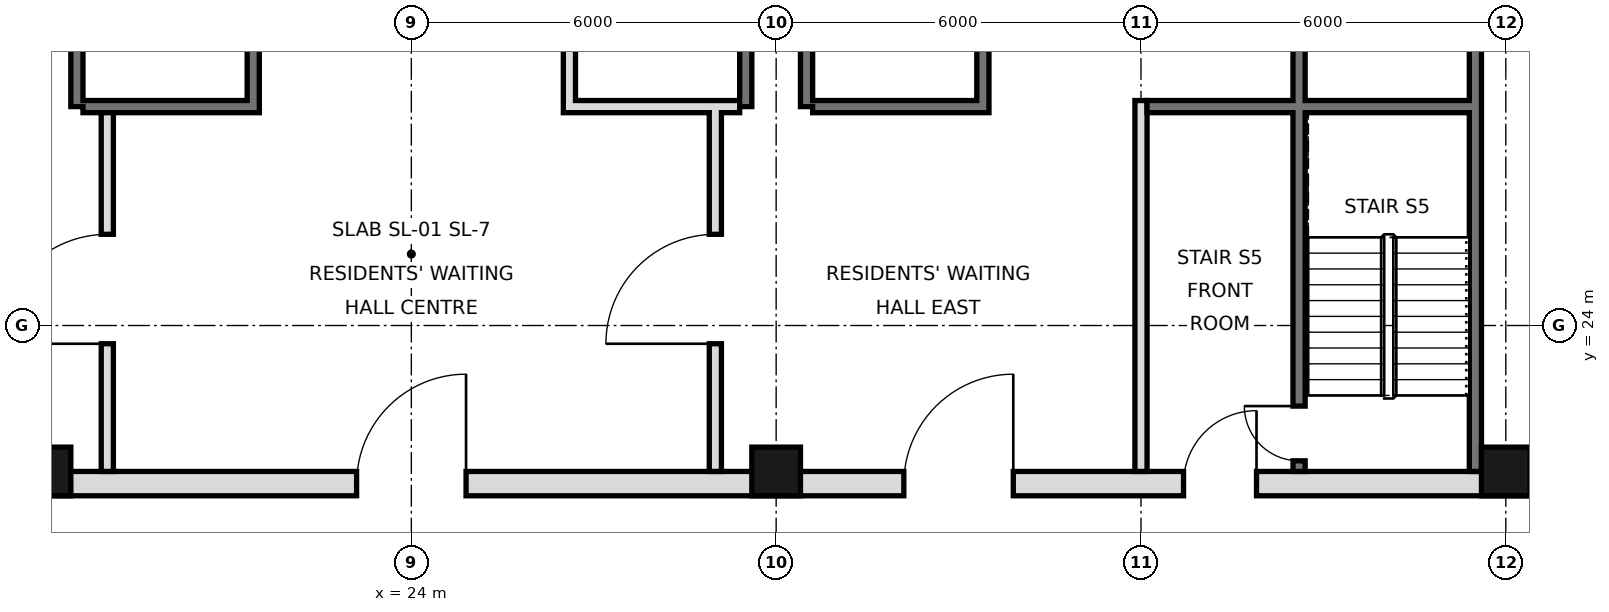
"""IFC4 building model, lengths in metres.
Left out: names, types, materials, properties, quantities, classifications, styles, units other than length and angle.
Written with IfcOpenShell. Run it as: python <this file> out.ifc"""

import sys

from ifc_helpers import new_model, si_unit, direction, frame, frame_2d, origin, origin_2d, place, context, subcontext, project, spatial, rectangle, hollow_rectangle, extrude, element, fill, save


model = new_model("IFC4")
c1 = context("Model", 3, precision=1e-05, world=origin(), true_north=direction((0.0, 1.0)))
c2 = subcontext(c1, "Body", "Model", "MODEL_VIEW")
j1 = project(units=[si_unit("LENGTHUNIT", "METRE"), si_unit("PLANEANGLEUNIT", "RADIAN")], contexts=[c1])
p1 = place(None, origin())
s1 = spatial("IfcSite", under=j1, at=p1, CompositionType="ELEMENT")
p2 = place(p1, origin())
s2 = spatial("IfcBuilding", under=s1, at=p2, CompositionType="ELEMENT")
p3 = place(p2, frame((0.0, 0.0, 158.2)))
s3 = spatial("IfcBuildingStorey", under=s2, at=p3, CompositionType="ELEMENT", Elevation=158.2)
for number, where, z_axis, x_axis in (
    (1, (18.0, 21.6, 0.0), (0.0, 0.0, 1.0), (1.0, 0.0, 0.0)),
    (2, (30.0, 21.6, 0.0), (0.0, 0.0, 1.0), (1.0, 0.0, 0.0)),
    (3, (42.0, 21.6, 0.0), (0.0, 0.0, 1.0), (1.0, 0.0, 0.0)),
):
    element("IfcColumn", number, at=place(p3, frame(where, z_axis=z_axis, x_axis=x_axis)), inside=s3, PredefinedType="COLUMN", context=c2, shape_type="SweptSolid", body=[
        extrude(hollow_rectangle(XDim=0.8, YDim=0.8, WallThickness=0.045, at=origin_2d()), origin(), (0.0, 0.0, 1.0), 3.6),
    ])
p4 = place(p3, frame((41.5, 21.6, 0.0), z_axis=(0.0, 0.0, 1.0), x_axis=(0.0, 1.0, 0.0)))
e4 = element("IfcWall", 4, at=p4, inside=s3, PredefinedType="SOLIDWALL", context=c2, shape_type="SweptSolid", body=[
    extrude(rectangle(XDim=23.5, YDim=0.2, at=frame_2d((11.75, 0.0))), origin(), (0.0, 0.0, 1.0), 3.38),
])
for number, where, z_axis, x_axis in (
    (5, (18.5, 27.6, 0.0), (0.0, 0.0, 1.0), (0.0, 1.0, 0.0)),
    (6, (29.5, 27.6, 0.0), (0.0, 0.0, 1.0), (0.0, 1.0, 0.0)),
    (7, (30.5, 27.6, 0.0), (0.0, 0.0, 1.0), (0.0, 1.0, 0.0)),
):
    element("IfcWall", number, at=place(p3, frame(where, z_axis=z_axis, x_axis=x_axis)), inside=s3, PredefinedType="SOLIDWALL", context=c2, shape_type="SweptSolid", body=[
        extrude(rectangle(XDim=17.5, YDim=0.2, at=frame_2d((8.75, 0.0))), origin(), (0.0, 0.0, 1.0), 3.38),
    ])
p5 = place(p3, frame((5.6, 21.4, 0.0), z_axis=(0.0, 0.0, 1.0), x_axis=(1.0, 0.0, 0.0)))
e8 = element("IfcWall", 8, at=p5, inside=s3, PredefinedType="SOLIDWALL", context=c2, shape_type="SweptSolid", body=[
    extrude(rectangle(XDim=36.8, YDim=0.4, at=frame_2d((18.4, 0.0))), origin(), (0.0, 0.0, 1.0), 3.38),
])
p6 = place(p5, frame((8.5, 0.0, 0.0)))
e9 = element("IfcOpeningElement", 9, at=p6, cuts=e8, PredefinedType="OPENING", context=c2, shape_type="SweptSolid", body=[
    extrude(rectangle(XDim=1.8, YDim=2.1, at=frame_2d((0.9, 1.05))), frame((0.0, 0.21, 0.0), z_axis=(0.0, -1.0, 0.0), x_axis=(1.0, 0.0, 0.0)), (0.0, 0.0, 1.0), 0.42),
])
p7 = place(p5, frame((17.5, 0.0, 0.0)))
e10 = element("IfcOpeningElement", 10, at=p7, cuts=e8, PredefinedType="OPENING", context=c2, shape_type="SweptSolid", body=[
    extrude(rectangle(XDim=1.8, YDim=2.1, at=frame_2d((0.9, 1.05))), frame((0.0, 0.21, 0.0), z_axis=(0.0, -1.0, 0.0), x_axis=(1.0, 0.0, 0.0)), (0.0, 0.0, 1.0), 0.42),
])
p8 = place(p5, frame((26.5, 0.0, 0.0)))
e11 = element("IfcOpeningElement", 11, at=p8, cuts=e8, PredefinedType="OPENING", context=c2, shape_type="SweptSolid", body=[
    extrude(rectangle(XDim=1.8, YDim=2.1, at=frame_2d((0.9, 1.05))), frame((0.0, 0.21, 0.0), z_axis=(0.0, -1.0, 0.0), x_axis=(1.0, 0.0, 0.0)), (0.0, 0.0, 1.0), 0.42),
])
p9 = place(p5, frame((4.5, 0.0, 0.0)))
e12 = element("IfcOpeningElement", 12, at=p9, cuts=e8, PredefinedType="OPENING", context=c2, shape_type="SweptSolid", body=[
    extrude(rectangle(XDim=1.2, YDim=2.1, at=frame_2d((0.6, 1.05))), frame((0.0, 0.21, 0.0), z_axis=(0.0, -1.0, 0.0), x_axis=(1.0, 0.0, 0.0)), (0.0, 0.0, 1.0), 0.42),
])
p10 = place(p5, frame((31.1, 0.0, 0.0)))
e13 = element("IfcOpeningElement", 13, at=p10, cuts=e8, PredefinedType="OPENING", context=c2, shape_type="SweptSolid", body=[
    extrude(rectangle(XDim=1.2, YDim=2.1, at=frame_2d((0.6, 1.05))), frame((0.0, 0.21, 0.0), z_axis=(0.0, -1.0, 0.0), x_axis=(1.0, 0.0, 0.0)), (0.0, 0.0, 1.0), 0.42),
])
p11 = place(p3, frame((19.0, 21.6, 0.0), z_axis=(0.0, 0.0, 1.0), x_axis=(0.0, 1.0, 0.0)))
e14 = element("IfcWall", 14, at=p11, inside=s3, PredefinedType="PARTITIONING", context=c2, shape_type="SweptSolid", body=[
    extrude(rectangle(XDim=6.0, YDim=0.2, at=frame_2d((3.0, 0.0))), origin(), (0.0, 0.0, 1.0), 3.38),
])
p12 = place(p11, frame((2.1, 0.0, 0.0)))
e15 = element("IfcOpeningElement", 15, at=p12, cuts=e14, PredefinedType="OPENING", context=c2, shape_type="SweptSolid", body=[
    extrude(rectangle(XDim=1.8, YDim=2.1, at=frame_2d((0.9, 1.05))), frame((0.0, 0.11, 0.0), z_axis=(0.0, -1.0, 0.0), x_axis=(1.0, 0.0, 0.0)), (0.0, 0.0, 1.0), 0.22),
])
p13 = place(p3, frame((29.0, 21.6, 0.0), z_axis=(0.0, 0.0, 1.0), x_axis=(0.0, 1.0, 0.0)))
e16 = element("IfcWall", 16, at=p13, inside=s3, PredefinedType="PARTITIONING", context=c2, shape_type="SweptSolid", body=[
    extrude(rectangle(XDim=6.0, YDim=0.2, at=frame_2d((3.0, 0.0))), origin(), (0.0, 0.0, 1.0), 3.38),
])
p14 = place(p13, frame((2.1, 0.0, 0.0)))
e17 = element("IfcOpeningElement", 17, at=p14, cuts=e16, PredefinedType="OPENING", context=c2, shape_type="SweptSolid", body=[
    extrude(rectangle(XDim=1.8, YDim=2.1, at=frame_2d((0.9, 1.05))), frame((0.0, 0.11, 0.0), z_axis=(0.0, -1.0, 0.0), x_axis=(1.0, 0.0, 0.0)), (0.0, 0.0, 1.0), 0.22),
])
p15 = place(p3, frame((21.4, 27.5, 0.0), z_axis=(0.0, 0.0, 1.0), x_axis=(0.0, 1.0, 0.0)))
e18 = element("IfcWall", 18, at=p15, inside=s3, PredefinedType="SOLIDWALL", context=c2, shape_type="SweptSolid", body=[
    extrude(rectangle(XDim=17.5, YDim=0.2, at=frame_2d((8.75, 0.0))), origin(), (0.0, 0.0, 1.0), 3.38),
])
p16 = place(p15, frame((9.8, 0.0, 0.0)))
e19 = element("IfcOpeningElement", 19, at=p16, cuts=e18, PredefinedType="OPENING", context=c2, shape_type="SweptSolid", body=[
    extrude(rectangle(XDim=1.0, YDim=2.1, at=frame_2d((0.5, 1.05))), frame((0.0, 0.11, 0.0), z_axis=(0.0, -1.0, 0.0), x_axis=(1.0, 0.0, 0.0)), (0.0, 0.0, 1.0), 0.22),
])
p17 = place(p15, frame((7.4, 0.0, 0.0)))
e20 = element("IfcOpeningElement", 20, at=p17, cuts=e18, PredefinedType="OPENING", context=c2, shape_type="SweptSolid", body=[
    extrude(rectangle(XDim=0.9, YDim=2.1, at=frame_2d((0.45, 1.05))), frame((0.0, 0.11, 0.0), z_axis=(0.0, -1.0, 0.0), x_axis=(1.0, 0.0, 0.0)), (0.0, 0.0, 1.0), 0.22),
])
p18 = place(p3, frame((26.6, 27.5, 0.0), z_axis=(0.0, 0.0, 1.0), x_axis=(0.0, 1.0, 0.0)))
e21 = element("IfcWall", 21, at=p18, inside=s3, PredefinedType="SOLIDWALL", context=c2, shape_type="SweptSolid", body=[
    extrude(rectangle(XDim=17.5, YDim=0.2, at=frame_2d((8.75, 0.0))), origin(), (0.0, 0.0, 1.0), 3.38),
])
p19 = place(p18, frame((4.3, 0.0, 0.0)))
e22 = element("IfcOpeningElement", 22, at=p19, cuts=e21, PredefinedType="OPENING", context=c2, shape_type="SweptSolid", body=[
    extrude(rectangle(XDim=0.9, YDim=2.1, at=frame_2d((0.45, 1.05))), frame((0.0, 0.11, 0.0), z_axis=(0.0, -1.0, 0.0), x_axis=(1.0, 0.0, 0.0)), (0.0, 0.0, 1.0), 0.22),
])
p20 = place(p18, frame((10.35, 0.0, 0.0)))
e23 = element("IfcOpeningElement", 23, at=p20, cuts=e21, PredefinedType="OPENING", context=c2, shape_type="SweptSolid", body=[
    extrude(rectangle(XDim=1.0, YDim=2.1, at=frame_2d((0.5, 1.05))), frame((0.0, 0.11, 0.0), z_axis=(0.0, -1.0, 0.0), x_axis=(1.0, 0.0, 0.0)), (0.0, 0.0, 1.0), 0.22),
])
p21 = place(p18, frame((15.475, 0.0, 0.0)))
e24 = element("IfcOpeningElement", 24, at=p21, cuts=e21, PredefinedType="OPENING", context=c2, shape_type="SweptSolid", body=[
    extrude(rectangle(XDim=1.0, YDim=2.1, at=frame_2d((0.5, 1.05))), frame((0.0, 0.11, 0.0), z_axis=(0.0, -1.0, 0.0), x_axis=(1.0, 0.0, 0.0)), (0.0, 0.0, 1.0), 0.22),
])
p22 = place(p3, frame((33.4, 27.5, 0.0), z_axis=(0.0, 0.0, 1.0), x_axis=(0.0, 1.0, 0.0)))
e25 = element("IfcWall", 25, at=p22, inside=s3, PredefinedType="SOLIDWALL", context=c2, shape_type="SweptSolid", body=[
    extrude(rectangle(XDim=17.5, YDim=0.2, at=frame_2d((8.75, 0.0))), origin(), (0.0, 0.0, 1.0), 3.38),
])
p23 = place(p22, frame((15.4, 0.0, 0.0)))
e26 = element("IfcOpeningElement", 26, at=p23, cuts=e25, PredefinedType="OPENING", context=c2, shape_type="SweptSolid", body=[
    extrude(rectangle(XDim=1.1, YDim=2.1, at=frame_2d((0.55, 1.05))), frame((0.0, 0.11, 0.0), z_axis=(0.0, -1.0, 0.0), x_axis=(1.0, 0.0, 0.0)), (0.0, 0.0, 1.0), 0.22),
])
p24 = place(p22, frame((9.9, 0.0, 0.0)))
e27 = element("IfcOpeningElement", 27, at=p24, cuts=e25, PredefinedType="OPENING", context=c2, shape_type="SweptSolid", body=[
    extrude(rectangle(XDim=0.9, YDim=2.1, at=frame_2d((0.45, 1.05))), frame((0.0, 0.11, 0.0), z_axis=(0.0, -1.0, 0.0), x_axis=(1.0, 0.0, 0.0)), (0.0, 0.0, 1.0), 0.22),
])
p25 = place(p3, frame((36.0, 21.6, 0.0), z_axis=(0.0, 0.0, 1.0), x_axis=(0.0, 1.0, 0.0)))
e28 = element("IfcWall", 28, at=p25, inside=s3, PredefinedType="PARTITIONING", context=c2, shape_type="SweptSolid", body=[
    extrude(rectangle(XDim=6.1, YDim=0.2, at=frame_2d((3.05, 0.0))), origin(), (0.0, 0.0, 1.0), 3.38),
])
p26 = place(p3, frame((38.6, 21.6, 0.0), z_axis=(0.0, 0.0, 1.0), x_axis=(0.0, 1.0, 0.0)))
e29 = element("IfcWall", 29, at=p26, inside=s3, PredefinedType="SOLIDWALL", context=c2, shape_type="SweptSolid", body=[
    extrude(rectangle(XDim=23.4, YDim=0.2, at=frame_2d((11.7, 0.0))), origin(), (0.0, 0.0, 1.0), 3.38),
])
p27 = place(p26, frame((15.7, 0.0, 0.0)))
e30 = element("IfcOpeningElement", 30, at=p27, cuts=e29, PredefinedType="OPENING", context=c2, shape_type="SweptSolid", body=[
    extrude(rectangle(XDim=1.0, YDim=2.1, at=frame_2d((0.5, 1.05))), frame((0.0, 0.11, 0.0), z_axis=(0.0, -1.0, 0.0), x_axis=(1.0, 0.0, 0.0)), (0.0, 0.0, 1.0), 0.22),
])
p28 = place(p26, frame((0.175, 0.0, 0.0)))
e31 = element("IfcOpeningElement", 31, at=p28, cuts=e29, PredefinedType="OPENING", context=c2, shape_type="SweptSolid", body=[
    extrude(rectangle(XDim=0.9, YDim=2.1, at=frame_2d((0.45, 1.05))), frame((0.0, 0.11, 0.0), z_axis=(0.0, -1.0, 0.0), x_axis=(1.0, 0.0, 0.0)), (0.0, 0.0, 1.0), 0.22),
])
for number, where, z_axis, x_axis in (
    (32, (18.6, 27.6, 0.0), (0.0, 0.0, 1.0), (1.0, 0.0, 0.0)),
    (33, (26.7, 27.6, 0.0), (0.0, 0.0, 1.0), (1.0, 0.0, 0.0)),
    (34, (30.6, 27.6, 0.0), (0.0, 0.0, 1.0), (1.0, 0.0, 0.0)),
):
    element("IfcWall", number, at=place(p3, frame(where, z_axis=z_axis, x_axis=x_axis)), inside=s3, PredefinedType="SOLIDWALL", context=c2, shape_type="SweptSolid", body=[
        extrude(rectangle(XDim=2.7, YDim=0.2, at=frame_2d((1.35, 0.0))), origin(), (0.0, 0.0, 1.0), 3.38),
    ])
p29 = place(p3, frame((36.1, 27.6, 0.0), z_axis=(0.0, 0.0, 1.0), x_axis=(1.0, 0.0, 0.0)))
e35 = element("IfcWall", 35, at=p29, inside=s3, PredefinedType="SOLIDWALL", context=c2, shape_type="SweptSolid", body=[
    extrude(rectangle(XDim=5.3, YDim=0.2, at=frame_2d((2.65, 0.0))), origin(), (0.0, 0.0, 1.0), 3.38),
])
p30 = place(p12, origin())
e36 = element("IfcDoor", 36, at=p30, inside=s3, OperationType="SINGLE_SWING_LEFT", PredefinedType="DOOR", context=c2, shape_type="SweptSolid", body=[
    extrude(rectangle(XDim=1.8, YDim=2.1, at=frame_2d((0.9, 1.05))), frame((0.0, 0.025, 0.0), z_axis=(0.0, -1.0, 0.0), x_axis=(1.0, 0.0, 0.0)), (0.0, 0.0, 1.0), 0.05),
])
fill(e15, e36)
p31 = place(p7, frame((1.8, 0.0, 0.0), z_axis=(0.0, 0.0, 1.0), x_axis=(-1.0, 0.0, 0.0)))
e37 = element("IfcDoor", 37, at=p31, inside=s3, OperationType="SINGLE_SWING_LEFT", PredefinedType="DOOR", context=c2, shape_type="SweptSolid", body=[
    extrude(rectangle(XDim=1.8, YDim=2.1, at=frame_2d((0.9, 1.05))), frame((0.0, 0.025, 0.0), z_axis=(0.0, -1.0, 0.0), x_axis=(1.0, 0.0, 0.0)), (0.0, 0.0, 1.0), 0.05),
])
fill(e10, e37)
p32 = place(p14, origin())
e38 = element("IfcDoor", 38, at=p32, inside=s3, OperationType="SINGLE_SWING_LEFT", PredefinedType="DOOR", context=c2, shape_type="SweptSolid", body=[
    extrude(rectangle(XDim=1.8, YDim=2.1, at=frame_2d((0.9, 1.05))), frame((0.0, 0.025, 0.0), z_axis=(0.0, -1.0, 0.0), x_axis=(1.0, 0.0, 0.0)), (0.0, 0.0, 1.0), 0.05),
])
fill(e17, e38)
p33 = place(p8, frame((1.8, 0.0, 0.0), z_axis=(0.0, 0.0, 1.0), x_axis=(-1.0, 0.0, 0.0)))
e39 = element("IfcDoor", 39, at=p33, inside=s3, OperationType="SINGLE_SWING_LEFT", PredefinedType="DOOR", context=c2, shape_type="SweptSolid", body=[
    extrude(rectangle(XDim=1.8, YDim=2.1, at=frame_2d((0.9, 1.05))), frame((0.0, 0.025, 0.0), z_axis=(0.0, -1.0, 0.0), x_axis=(1.0, 0.0, 0.0)), (0.0, 0.0, 1.0), 0.05),
])
fill(e11, e39)
p34 = place(p10, frame((1.2, 0.0, 0.0), z_axis=(0.0, 0.0, 1.0), x_axis=(-1.0, 0.0, 0.0)))
e40 = element("IfcDoor", 40, at=p34, inside=s3, OperationType="SINGLE_SWING_LEFT", PredefinedType="DOOR", context=c2, shape_type="SweptSolid", body=[
    extrude(rectangle(XDim=1.2, YDim=2.1, at=frame_2d((0.6, 1.05))), frame((0.0, 0.025, 0.0), z_axis=(0.0, -1.0, 0.0), x_axis=(1.0, 0.0, 0.0)), (0.0, 0.0, 1.0), 0.05),
])
fill(e13, e40)
p35 = place(p28, frame((0.9, 0.0, 0.0), z_axis=(0.0, 0.0, 1.0), x_axis=(-1.0, 0.0, 0.0)))
e41 = element("IfcDoor", 41, at=p35, inside=s3, OperationType="SINGLE_SWING_LEFT", PredefinedType="DOOR", context=c2, shape_type="SweptSolid", body=[
    extrude(rectangle(XDim=0.9, YDim=2.1, at=frame_2d((0.45, 1.05))), frame((0.0, 0.025, 0.0), z_axis=(0.0, -1.0, 0.0), x_axis=(1.0, 0.0, 0.0)), (0.0, 0.0, 1.0), 0.05),
])
fill(e31, e41)
save(model, sys.argv[1])
